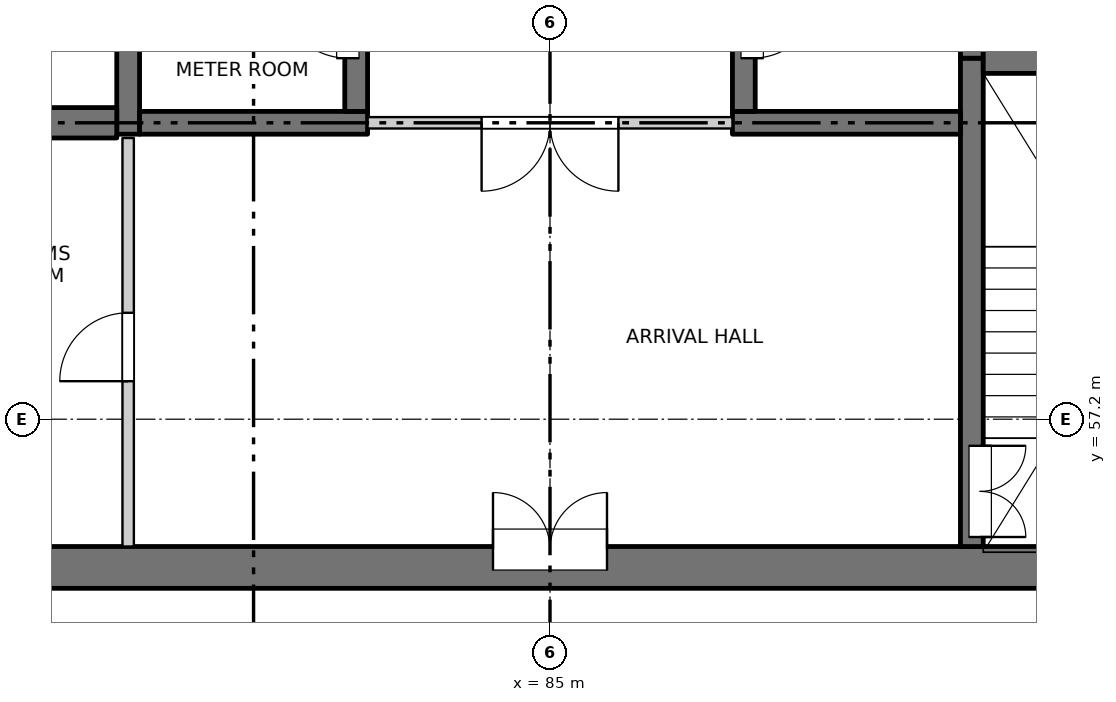
"""IFC4 building model, lengths in metres.
Left out: names, types, materials, properties, quantities, classifications, styles, units other than length and angle.
Written with IfcOpenShell. Run it as: python <this file> out.ifc"""

import sys

from ifc_helpers import new_model, si_unit, direction, frame, frame_2d, origin, place, context, subcontext, project, spatial, rectangle, extrude, element, fill, save


model = new_model("IFC4")
c1 = context("Model", 3, precision=1e-05, world=origin(), true_north=direction((0.0, 1.0)))
c2 = subcontext(c1, "Body", "Model", "MODEL_VIEW")
j1 = project(units=[si_unit("LENGTHUNIT", "METRE"), si_unit("PLANEANGLEUNIT", "RADIAN")], contexts=[c1])
p1 = place(None, origin())
s1 = spatial("IfcSite", under=j1, at=p1, CompositionType="ELEMENT")
p2 = place(p1, origin())
s2 = spatial("IfcBuilding", under=s1, at=p2, CompositionType="ELEMENT")
p3 = place(p2, frame((0.0, 0.0, 155.4)))
s3 = spatial("IfcBuildingStorey", under=s2, at=p3, CompositionType="ELEMENT", Elevation=155.4)
p4 = place(p3, frame((75.525, 55.25, -0.25), z_axis=(0.0, 0.0, 1.0), x_axis=(1.0, 0.0, 0.0)))
e1 = element("IfcWall", 1, at=p4, inside=s3, PredefinedType="SOLIDWALL", context=c2, shape_type="SweptSolid", body=[
    extrude(rectangle(XDim=18.95, YDim=0.55, at=frame_2d((9.475, 0.0))), origin(), (0.0, 0.0, 1.0), 3.4),
])
p5 = place(p4, frame((8.725, 0.0, 0.25)))
e2 = element("IfcOpeningElement", 2, at=p5, cuts=e1, PredefinedType="OPENING", context=c2, shape_type="SweptSolid", body=[
    extrude(rectangle(XDim=1.5, YDim=2.1, at=frame_2d((0.75, 1.05))), frame((0.0, 0.285, 0.0), z_axis=(0.0, -1.0, 0.0), x_axis=(1.0, 0.0, 0.0)), (0.0, 0.0, 1.0), 0.57),
])
p6 = place(p3, frame((79.45, 60.95, -0.25), z_axis=(0.0, 0.0, 1.0), x_axis=(0.0, 1.0, 0.0)))
e3 = element("IfcWall", 3, at=p6, inside=s3, PredefinedType="SOLIDWALL", context=c2, shape_type="SweptSolid", body=[
    extrude(rectangle(XDim=16.35, YDim=0.3, at=frame_2d((8.175, 0.0))), origin(), (0.0, 0.0, 1.0), 3.4),
])
p7 = place(p3, frame((90.55, 55.525, -0.25), z_axis=(0.0, 0.0, 1.0), x_axis=(0.0, 1.0, 0.0)))
e4 = element("IfcWall", 4, at=p7, inside=s3, PredefinedType="SOLIDWALL", context=c2, shape_type="SweptSolid", body=[
    extrude(rectangle(XDim=6.425, YDim=0.3, at=frame_2d((3.212, 0.0))), origin(), (0.0, 0.0, 1.0), 3.4),
])
p8 = place(p7, frame((0.125, 0.0, 0.25)))
e5 = element("IfcOpeningElement", 5, at=p8, cuts=e4, PredefinedType="OPENING", context=c2, shape_type="SweptSolid", body=[
    extrude(rectangle(XDim=1.2, YDim=2.1, at=frame_2d((0.6, 1.05))), frame((0.0, 0.16, 0.0), z_axis=(0.0, -1.0, 0.0), x_axis=(1.0, 0.0, 0.0)), (0.0, 0.0, 1.0), 0.32),
])
p9 = place(p3, frame((90.55, 61.95, -0.25), z_axis=(0.0, 0.0, 1.0), x_axis=(0.0, 1.0, 0.0)))
e6 = element("IfcWall", 6, at=p9, inside=s3, PredefinedType="SOLIDWALL", context=c2, shape_type="SweptSolid", body=[
    extrude(rectangle(XDim=15.35, YDim=0.3, at=frame_2d((7.675, 0.0))), origin(), (0.0, 0.0, 1.0), 3.4),
])
p10 = place(p3, frame((79.6, 61.1, -0.25), z_axis=(0.0, 0.0, 1.0), x_axis=(1.0, 0.0, 0.0)))
e7 = element("IfcWall", 7, at=p10, inside=s3, PredefinedType="SOLIDWALL", context=c2, shape_type="SweptSolid", body=[
    extrude(rectangle(XDim=3.0, YDim=0.3, at=frame_2d((1.5, 0.0))), origin(), (0.0, 0.0, 1.0), 3.4),
])
p11 = place(p3, frame((82.45, 61.25, -0.25), z_axis=(0.0, 0.0, 1.0), x_axis=(0.0, 1.0, 0.0)))
e8 = element("IfcWall", 8, at=p11, inside=s3, PredefinedType="SOLIDWALL", context=c2, shape_type="SweptSolid", body=[
    extrude(rectangle(XDim=2.3, YDim=0.3, at=frame_2d((1.15, 0.0))), origin(), (0.0, 0.0, 1.0), 3.4),
])
p12 = place(p11, frame((0.7, 0.0, 0.25)))
e9 = element("IfcOpeningElement", 9, at=p12, cuts=e8, PredefinedType="OPENING", context=c2, shape_type="SweptSolid", body=[
    extrude(rectangle(XDim=0.9, YDim=2.1, at=frame_2d((0.45, 1.05))), frame((0.0, 0.16, 0.0), z_axis=(0.0, -1.0, 0.0), x_axis=(1.0, 0.0, 0.0)), (0.0, 0.0, 1.0), 0.32),
])
p13 = place(p3, frame((87.4, 61.1, -0.25), z_axis=(0.0, 0.0, 1.0), x_axis=(1.0, 0.0, 0.0)))
e10 = element("IfcWall", 10, at=p13, inside=s3, PredefinedType="SOLIDWALL", context=c2, shape_type="SweptSolid", body=[
    extrude(rectangle(XDim=3.0, YDim=0.3, at=frame_2d((1.5, 0.0))), origin(), (0.0, 0.0, 1.0), 3.4),
])
p14 = place(p3, frame((87.55, 61.25, -0.25), z_axis=(0.0, 0.0, 1.0), x_axis=(0.0, 1.0, 0.0)))
e11 = element("IfcWall", 11, at=p14, inside=s3, PredefinedType="SOLIDWALL", context=c2, shape_type="SweptSolid", body=[
    extrude(rectangle(XDim=2.3, YDim=0.3, at=frame_2d((1.15, 0.0))), origin(), (0.0, 0.0, 1.0), 3.4),
])
p15 = place(p14, frame((0.7, 0.0, 0.25)))
e12 = element("IfcOpeningElement", 12, at=p15, cuts=e11, PredefinedType="OPENING", context=c2, shape_type="SweptSolid", body=[
    extrude(rectangle(XDim=0.9, YDim=2.1, at=frame_2d((0.45, 1.05))), frame((0.0, 0.16, 0.0), z_axis=(0.0, -1.0, 0.0), x_axis=(1.0, 0.0, 0.0)), (0.0, 0.0, 1.0), 0.32),
])
for number, where, z_axis, x_axis in (
    (13, (75.525, 61.1, -0.25), (0.0, 0.0, 1.0), (1.0, 0.0, 0.0)),
    (14, (90.7, 61.95, -0.25), (0.0, 0.0, 1.0), (1.0, 0.0, 0.0)),
):
    element("IfcWall", number, at=place(p3, frame(where, z_axis=z_axis, x_axis=x_axis)), inside=s3, PredefinedType="SOLIDWALL", context=c2, shape_type="SweptSolid", body=[
        extrude(rectangle(XDim=3.775, YDim=0.4, at=frame_2d((1.888, 0.0))), origin(), (0.0, 0.0, 1.0), 3.4),
    ])
p16 = place(p3, frame((82.6, 61.1, 0.0), z_axis=(0.0, 0.0, 1.0), x_axis=(1.0, 0.0, 0.0)))
e15 = element("IfcWall", 15, at=p16, inside=s3, PredefinedType="PARTITIONING", context=c2, shape_type="SweptSolid", body=[
    extrude(rectangle(XDim=4.8, YDim=0.15, at=frame_2d((2.4, 0.0))), origin(), (0.0, 0.0, 1.0), 3.15),
])
p17 = place(p16, frame((1.5, 0.0, 0.0)))
e16 = element("IfcOpeningElement", 16, at=p17, cuts=e15, PredefinedType="OPENING", context=c2, shape_type="SweptSolid", body=[
    extrude(rectangle(XDim=1.8, YDim=2.1, at=frame_2d((0.9, 1.05))), frame((0.0, 0.085, 0.0), z_axis=(0.0, -1.0, 0.0), x_axis=(1.0, 0.0, 0.0)), (0.0, 0.0, 1.0), 0.17),
])
p18 = place(p3, frame((79.45, 55.525, 0.0), z_axis=(0.0, 0.0, 1.0), x_axis=(0.0, 1.0, 0.0)))
e17 = element("IfcWall", 17, at=p18, inside=s3, PredefinedType="PARTITIONING", context=c2, shape_type="SweptSolid", body=[
    extrude(rectangle(XDim=5.375, YDim=0.15, at=frame_2d((2.688, 0.0))), origin(), (0.0, 0.0, 1.0), 3.15),
])
p19 = place(p18, frame((2.175, 0.0, 0.0)))
e18 = element("IfcOpeningElement", 18, at=p19, cuts=e17, PredefinedType="OPENING", context=c2, shape_type="SweptSolid", body=[
    extrude(rectangle(XDim=0.9, YDim=2.1, at=frame_2d((0.45, 1.05))), frame((0.0, 0.085, 0.0), z_axis=(0.0, -1.0, 0.0), x_axis=(1.0, 0.0, 0.0)), (0.0, 0.0, 1.0), 0.17),
])
p20 = place(p5, origin())
e19 = element("IfcDoor", 19, at=p20, inside=s3, OperationType="DOUBLE_DOOR_SINGLE_SWING", PredefinedType="DOOR", context=c2, shape_type="SweptSolid", body=[
    extrude(rectangle(XDim=1.5, YDim=2.1, at=frame_2d((0.75, 1.05))), frame((0.0, 0.26, 0.0), z_axis=(0.0, -1.0, 0.0), x_axis=(1.0, 0.0, 0.0)), (0.0, 0.0, 1.0), 0.05),
])
fill(e2, e19)
p21 = place(p8, origin())
e20 = element("IfcDoor", 20, at=p21, inside=s3, OperationType="DOUBLE_DOOR_SINGLE_SWING", PredefinedType="DOOR", context=c2, shape_type="SweptSolid", body=[
    extrude(rectangle(XDim=1.2, YDim=2.1, at=frame_2d((0.6, 1.05))), frame((0.0, -0.085, 0.0), z_axis=(0.0, -1.0, 0.0), x_axis=(1.0, 0.0, 0.0)), (0.0, 0.0, 1.0), 0.05),
])
fill(e5, e20)
p22 = place(p19, origin())
e21 = element("IfcDoor", 21, at=p22, inside=s3, OperationType="SINGLE_SWING_LEFT", PredefinedType="DOOR", context=c2, shape_type="SweptSolid", body=[
    extrude(rectangle(XDim=0.9, YDim=2.1, at=frame_2d((0.45, 1.05))), frame((0.0, 0.025, 0.0), z_axis=(0.0, -1.0, 0.0), x_axis=(1.0, 0.0, 0.0)), (0.0, 0.0, 1.0), 0.05),
])
fill(e18, e21)
p23 = place(p17, origin())
e22 = element("IfcDoor", 22, at=p23, inside=s3, OperationType="DOUBLE_DOOR_SINGLE_SWING", PredefinedType="DOOR", context=c2, shape_type="SweptSolid", body=[
    extrude(rectangle(XDim=1.8, YDim=2.1, at=frame_2d((0.9, 1.05))), frame((0.0, 0.025, 0.0), z_axis=(0.0, -1.0, 0.0), x_axis=(1.0, 0.0, 0.0)), (0.0, 0.0, 1.0), 0.05),
])
fill(e16, e22)
p24 = place(p12, origin())
e23 = element("IfcDoor", 23, at=p24, inside=s3, OperationType="SINGLE_SWING_RIGHT", PredefinedType="DOOR", context=c2, shape_type="SweptSolid", body=[
    extrude(rectangle(XDim=0.9, YDim=2.1, at=frame_2d((0.45, 1.05))), frame((0.0, 0.135, 0.0), z_axis=(0.0, -1.0, 0.0), x_axis=(1.0, 0.0, 0.0)), (0.0, 0.0, 1.0), 0.05),
])
fill(e9, e23)
p25 = place(p15, origin())
e24 = element("IfcDoor", 24, at=p25, inside=s3, OperationType="SINGLE_SWING_LEFT", PredefinedType="DOOR", context=c2, shape_type="SweptSolid", body=[
    extrude(rectangle(XDim=0.9, YDim=2.1, at=frame_2d((0.45, 1.05))), frame((0.0, -0.085, 0.0), z_axis=(0.0, -1.0, 0.0), x_axis=(1.0, 0.0, 0.0)), (0.0, 0.0, 1.0), 0.05),
])
fill(e12, e24)
save(model, sys.argv[1])
